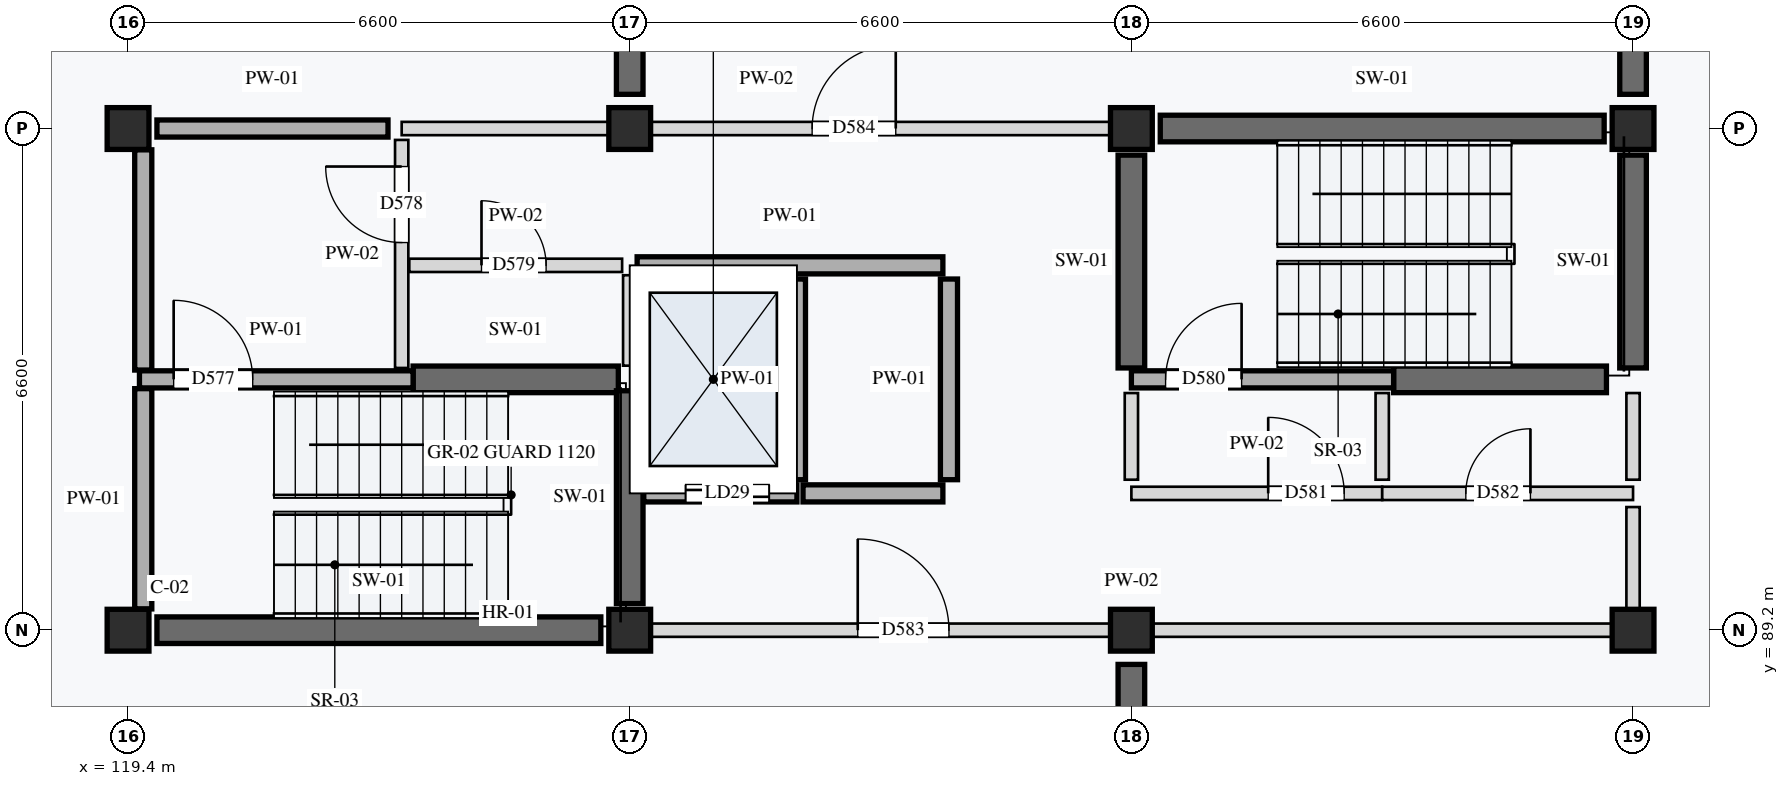
"""IFC4 building model, lengths in metres.
Left out: names, types, materials, properties, quantities, classifications, styles, units other than length and angle.
Written with IfcOpenShell. Run it as: python <this file> out.ifc"""

import sys

from ifc_helpers import new_model, si_unit, direction, frame, frame_2d, origin, origin_2d, place, context, subcontext, project, spatial, rectangle, extrude, element, fill, save


model = new_model("IFC4")
c1 = context("Model", 3, precision=1e-05, world=origin(), true_north=direction((0.0, 1.0)))
c2 = subcontext(c1, "Body", "Model", "MODEL_VIEW")
j1 = project(units=[si_unit("LENGTHUNIT", "METRE"), si_unit("PLANEANGLEUNIT", "RADIAN")], contexts=[c1])
p1 = place(None, origin())
s1 = spatial("IfcSite", under=j1, at=p1, CompositionType="ELEMENT")
p2 = place(p1, origin())
s2 = spatial("IfcBuilding", under=s1, at=p2, CompositionType="ELEMENT")
p3 = place(p2, frame((0.0, 0.0, -3.8)))
s3 = spatial("IfcBuildingStorey", under=s2, at=p3, CompositionType="ELEMENT", Elevation=-3.8)
for number, where, z_axis, x_axis in (
    (1, (119.4, 89.2, 0.0), (0.0, 0.0, 1.0), (1.0, 0.0, 0.0)),
    (2, (119.4, 95.8, 0.0), (0.0, 0.0, 1.0), (1.0, 0.0, 0.0)),
    (3, (126.0, 89.2, 0.0), (0.0, 0.0, 1.0), (1.0, 0.0, 0.0)),
    (4, (126.0, 95.8, 0.0), (0.0, 0.0, 1.0), (1.0, 0.0, 0.0)),
    (5, (132.6, 89.2, 0.0), (0.0, 0.0, 1.0), (1.0, 0.0, 0.0)),
    (6, (132.6, 95.8, 0.0), (0.0, 0.0, 1.0), (1.0, 0.0, 0.0)),
    (7, (139.2, 89.2, 0.0), (0.0, 0.0, 1.0), (1.0, 0.0, 0.0)),
    (8, (139.2, 95.8, 0.0), (0.0, 0.0, 1.0), (1.0, 0.0, 0.0)),
):
    element("IfcColumn", number, at=place(p3, frame(where, z_axis=z_axis, x_axis=x_axis)), inside=s3, PredefinedType="COLUMN", context=c2, shape_type="SweptSolid", body=[
        extrude(rectangle(XDim=0.55, YDim=0.55, at=origin_2d()), origin(), (0.0, 0.0, 1.0), 3.8),
    ])
p4 = place(p3, frame((119.78, 89.2, 0.0), z_axis=(0.0, 0.0, 1.0), x_axis=(1.0, 0.0, 0.0)))
e9 = element("IfcWall", 9, at=p4, inside=s3, PredefinedType="SHEAR", context=c2, shape_type="SweptSolid", body=[
    extrude(rectangle(XDim=5.84, YDim=0.35, at=frame_2d((2.92, 0.0))), origin(), (0.0, 0.0, 1.0), 3.52),
])
p5 = place(p3, frame((123.15, 92.5, 0.0), z_axis=(0.0, 0.0, 1.0), x_axis=(1.0, 0.0, 0.0)))
e10 = element("IfcWall", 10, at=p5, inside=s3, PredefinedType="SHEAR", context=c2, shape_type="SweptSolid", body=[
    extrude(rectangle(XDim=2.7, YDim=0.35, at=frame_2d((1.35, 0.0))), origin(), (0.0, 0.0, 1.0), 3.52),
])
p6 = place(p3, frame((126.0, 89.55, 0.0), z_axis=(0.0, 0.0, 1.0), x_axis=(0.0, 1.0, 0.0)))
e11 = element("IfcWall", 11, at=p6, inside=s3, PredefinedType="SHEAR", context=c2, shape_type="SweptSolid", body=[
    extrude(rectangle(XDim=2.8, YDim=0.35, at=frame_2d((1.4, 0.0))), origin(), (0.0, 0.0, 1.0), 3.52),
])
p7 = place(p3, frame((132.98, 95.8, 0.0), z_axis=(0.0, 0.0, 1.0), x_axis=(1.0, 0.0, 0.0)))
e12 = element("IfcWall", 12, at=p7, inside=s3, PredefinedType="SHEAR", context=c2, shape_type="SweptSolid", body=[
    extrude(rectangle(XDim=5.84, YDim=0.35, at=frame_2d((2.92, 0.0))), origin(), (0.0, 0.0, 1.0), 3.52),
])
for number, where, z_axis, x_axis in (
    (13, (136.05, 92.5, 0.0), (0.0, 0.0, 1.0), (1.0, 0.0, 0.0)),
    (14, (132.6, 92.65, 0.0), (0.0, 0.0, 1.0), (0.0, 1.0, 0.0)),
    (15, (139.2, 92.65, 0.0), (0.0, 0.0, 1.0), (0.0, 1.0, 0.0)),
):
    element("IfcWall", number, at=place(p3, frame(where, z_axis=z_axis, x_axis=x_axis)), inside=s3, PredefinedType="SHEAR", context=c2, shape_type="SweptSolid", body=[
        extrude(rectangle(XDim=2.8, YDim=0.35, at=frame_2d((1.4, 0.0))), origin(), (0.0, 0.0, 1.0), 3.52),
    ])
for number, where, z_axis, x_axis in (
    (16, (132.6, 83.05, 0.0), (0.0, 0.0, 1.0), (0.0, 1.0, 0.0)),
    (17, (126.0, 96.25, 0.0), (0.0, 0.0, 1.0), (0.0, 1.0, 0.0)),
    (18, (139.2, 96.25, 0.0), (0.0, 0.0, 1.0), (0.0, 1.0, 0.0)),
):
    element("IfcWall", number, at=place(p3, frame(where, z_axis=z_axis, x_axis=x_axis)), inside=s3, PredefinedType="SHEAR", context=c2, shape_type="SweptSolid", body=[
        extrude(rectangle(XDim=5.7, YDim=0.35, at=frame_2d((2.85, 0.0))), origin(), (0.0, 0.0, 1.0), 3.52),
    ])
p8 = place(p3, frame((119.55, 92.5, 0.0), z_axis=(0.0, 0.0, 1.0), x_axis=(1.0, 0.0, 0.0)))
e19 = element("IfcWall", 19, at=p8, inside=s3, PredefinedType="STANDARD", context=c2, shape_type="SweptSolid", body=[
    extrude(rectangle(XDim=3.6, YDim=0.225, at=frame_2d((1.8, 0.0))), origin(), (0.0, 0.0, 1.0), 3.52),
])
p9 = place(p8, frame((0.45, 0.0, 0.0)))
e20 = element("IfcOpeningElement", 20, at=p9, cuts=e19, PredefinedType="OPENING", context=c2, shape_type="SweptSolid", body=[
    extrude(rectangle(XDim=1.04, YDim=2.12, at=frame_2d((0.52, 1.06))), frame((0.0, 0.123, 0.0), z_axis=(0.0, -1.0, 0.0), x_axis=(1.0, 0.0, 0.0)), (0.0, 0.0, 1.0), 0.245),
])
p10 = place(p3, frame((123.0, 92.65, 0.0), z_axis=(0.0, 0.0, 1.0), x_axis=(0.0, 1.0, 0.0)))
e21 = element("IfcWall", 21, at=p10, inside=s3, PredefinedType="PARTITIONING", context=c2, shape_type="SweptSolid", body=[
    extrude(rectangle(XDim=3.0, YDim=0.175, at=frame_2d((1.5, 0.0))), origin(), (0.0, 0.0, 1.0), 3.52),
])
p11 = place(p10, frame((1.65, 0.0, 0.0)))
e22 = element("IfcOpeningElement", 22, at=p11, cuts=e21, PredefinedType="OPENING", context=c2, shape_type="SweptSolid", body=[
    extrude(rectangle(XDim=1.0, YDim=2.1, at=frame_2d((0.5, 1.05))), frame((0.0, 0.097, 0.0), z_axis=(0.0, -1.0, 0.0), x_axis=(1.0, 0.0, 0.0)), (0.0, 0.0, 1.0), 0.195),
])
p12 = place(p3, frame((123.1, 94.0, 0.0), z_axis=(0.0, 0.0, 1.0), x_axis=(1.0, 0.0, 0.0)))
e23 = element("IfcWall", 23, at=p12, inside=s3, PredefinedType="PARTITIONING", context=c2, shape_type="SweptSolid", body=[
    extrude(rectangle(XDim=2.8, YDim=0.175, at=frame_2d((1.4, 0.0))), origin(), (0.0, 0.0, 1.0), 3.52),
])
p13 = place(p12, frame((0.95, 0.0, 0.0)))
e24 = element("IfcOpeningElement", 24, at=p13, cuts=e23, PredefinedType="OPENING", context=c2, shape_type="SweptSolid", body=[
    extrude(rectangle(XDim=0.85, YDim=2.0, at=frame_2d((0.425, 1.0))), frame((0.0, 0.097, 0.0), z_axis=(0.0, -1.0, 0.0), x_axis=(1.0, 0.0, 0.0)), (0.0, 0.0, 1.0), 0.195),
])
p14 = place(p3, frame((126.0, 92.68, 0.0), z_axis=(0.0, 0.0, 1.0), x_axis=(0.0, 1.0, 0.0)))
e25 = element("IfcWall", 25, at=p14, inside=s3, PredefinedType="PARTITIONING", context=c2, shape_type="SweptSolid", body=[
    extrude(rectangle(XDim=1.19, YDim=0.175, at=frame_2d((0.595, 0.0))), origin(), (0.0, 0.0, 1.0), 3.52),
])
p15 = place(p3, frame((126.185, 91.0, 0.0), z_axis=(0.0, 0.0, 1.0), x_axis=(1.0, 0.0, 0.0)))
e26 = element("IfcWall", 26, at=p15, inside=s3, PredefinedType="STANDARD", context=c2, shape_type="SweptSolid", body=[
    extrude(rectangle(XDim=2.015, YDim=0.225, at=frame_2d((1.007, 0.0))), origin(), (0.0, 0.0, 1.0), 3.52),
])
p16 = place(p15, frame((0.55, 0.0, 0.0)))
e27 = element("IfcOpeningElement", 27, at=p16, cuts=e26, PredefinedType="OPENING", context=c2, shape_type="SweptSolid", body=[
    extrude(rectangle(XDim=1.1, YDim=2.1, at=frame_2d((0.55, 1.05))), frame((0.0, 0.123, 0.0), z_axis=(0.0, -1.0, 0.0), x_axis=(1.0, 0.0, 0.0)), (0.0, 0.0, 1.0), 0.245),
])
p17 = place(p3, frame((128.28, 91.0, 0.0), z_axis=(0.0, 0.0, 1.0), x_axis=(1.0, 0.0, 0.0)))
e28 = element("IfcWall", 28, at=p17, inside=s3, PredefinedType="STANDARD", context=c2, shape_type="SweptSolid", body=[
    extrude(rectangle(XDim=1.84, YDim=0.225, at=frame_2d((0.92, 0.0))), origin(), (0.0, 0.0, 1.0), 3.52),
])
p18 = place(p3, frame((126.097, 94.0, 0.0), z_axis=(0.0, 0.0, 1.0), x_axis=(1.0, 0.0, 0.0)))
e29 = element("IfcWall", 29, at=p18, inside=s3, PredefinedType="STANDARD", context=c2, shape_type="SweptSolid", body=[
    extrude(rectangle(XDim=4.023, YDim=0.225, at=frame_2d((2.011, 0.0))), origin(), (0.0, 0.0, 1.0), 3.52),
])
for number, where, z_axis, x_axis in (
    (30, (128.2, 91.18, 0.0), (0.0, 0.0, 1.0), (0.0, 1.0, 0.0)),
    (31, (130.2, 91.18, 0.0), (0.0, 0.0, 1.0), (0.0, 1.0, 0.0)),
):
    element("IfcWall", number, at=place(p3, frame(where, z_axis=z_axis, x_axis=x_axis)), inside=s3, PredefinedType="STANDARD", context=c2, shape_type="SweptSolid", body=[
        extrude(rectangle(XDim=2.64, YDim=0.225, at=frame_2d((1.32, 0.0))), origin(), (0.0, 0.0, 1.0), 3.52),
    ])
p19 = place(p3, frame((132.6, 92.5, 0.0), z_axis=(0.0, 0.0, 1.0), x_axis=(1.0, 0.0, 0.0)))
e32 = element("IfcWall", 32, at=p19, inside=s3, PredefinedType="STANDARD", context=c2, shape_type="SweptSolid", body=[
    extrude(rectangle(XDim=3.45, YDim=0.225, at=frame_2d((1.725, 0.0))), origin(), (0.0, 0.0, 1.0), 3.52),
])
p20 = place(p19, frame((0.45, 0.0, 0.0)))
e33 = element("IfcOpeningElement", 33, at=p20, cuts=e32, PredefinedType="OPENING", context=c2, shape_type="SweptSolid", body=[
    extrude(rectangle(XDim=1.0, YDim=2.1, at=frame_2d((0.5, 1.05))), frame((0.0, 0.123, 0.0), z_axis=(0.0, -1.0, 0.0), x_axis=(1.0, 0.0, 0.0)), (0.0, 0.0, 1.0), 0.245),
])
p21 = place(p3, frame((132.6, 91.0, 0.0), z_axis=(0.0, 0.0, 1.0), x_axis=(1.0, 0.0, 0.0)))
e34 = element("IfcWall", 34, at=p21, inside=s3, PredefinedType="PARTITIONING", context=c2, shape_type="SweptSolid", body=[
    extrude(rectangle(XDim=3.3, YDim=0.175, at=frame_2d((1.65, 0.0))), origin(), (0.0, 0.0, 1.0), 3.52),
])
p22 = place(p21, frame((1.8, 0.0, 0.0)))
e35 = element("IfcOpeningElement", 35, at=p22, cuts=e34, PredefinedType="OPENING", context=c2, shape_type="SweptSolid", body=[
    extrude(rectangle(XDim=1.0, YDim=2.16, at=frame_2d((0.5, 1.08))), frame((0.0, 0.097, 0.0), z_axis=(0.0, -1.0, 0.0), x_axis=(1.0, 0.0, 0.0)), (0.0, 0.0, 1.0), 0.195),
])
p23 = place(p3, frame((135.9, 91.0, 0.0), z_axis=(0.0, 0.0, 1.0), x_axis=(1.0, 0.0, 0.0)))
e36 = element("IfcWall", 36, at=p23, inside=s3, PredefinedType="PARTITIONING", context=c2, shape_type="SweptSolid", body=[
    extrude(rectangle(XDim=3.3, YDim=0.175, at=frame_2d((1.65, 0.0))), origin(), (0.0, 0.0, 1.0), 3.52),
])
p24 = place(p23, frame((1.1, 0.0, 0.0)))
e37 = element("IfcOpeningElement", 37, at=p24, cuts=e36, PredefinedType="OPENING", context=c2, shape_type="SweptSolid", body=[
    extrude(rectangle(XDim=0.85, YDim=2.0, at=frame_2d((0.425, 1.0))), frame((0.0, 0.097, 0.0), z_axis=(0.0, -1.0, 0.0), x_axis=(1.0, 0.0, 0.0)), (0.0, 0.0, 1.0), 0.195),
])
p25 = place(p3, frame((132.6, 91.18, 0.0), z_axis=(0.0, 0.0, 1.0), x_axis=(0.0, 1.0, 0.0)))
e38 = element("IfcWall", 38, at=p25, inside=s3, PredefinedType="PARTITIONING", context=c2, shape_type="SweptSolid", body=[
    extrude(rectangle(XDim=1.14, YDim=0.175, at=frame_2d((0.57, 0.0))), origin(), (0.0, 0.0, 1.0), 3.35),
])
for number, where, z_axis, x_axis in (
    (39, (135.9, 91.18, 0.0), (0.0, 0.0, 1.0), (0.0, 1.0, 0.0)),
    (40, (139.2, 91.18, 0.0), (0.0, 0.0, 1.0), (0.0, 1.0, 0.0)),
):
    element("IfcWall", number, at=place(p3, frame(where, z_axis=z_axis, x_axis=x_axis)), inside=s3, PredefinedType="PARTITIONING", context=c2, shape_type="SweptSolid", body=[
        extrude(rectangle(XDim=1.14, YDim=0.175, at=frame_2d((0.57, 0.0))), origin(), (0.0, 0.0, 1.0), 3.52),
    ])
p26 = place(p3, frame((126.0, 89.2, 0.0), z_axis=(0.0, 0.0, 1.0), x_axis=(1.0, 0.0, 0.0)))
e41 = element("IfcWall", 41, at=p26, inside=s3, PredefinedType="PARTITIONING", context=c2, shape_type="SweptSolid", body=[
    extrude(rectangle(XDim=13.2, YDim=0.175, at=frame_2d((6.6, 0.0))), origin(), (0.0, 0.0, 1.0), 3.15),
])
p27 = place(p26, frame((3.0, 0.0, 0.0)))
e42 = element("IfcOpeningElement", 42, at=p27, cuts=e41, PredefinedType="OPENING", context=c2, shape_type="SweptSolid", body=[
    extrude(rectangle(XDim=1.2, YDim=2.18, at=frame_2d((0.6, 1.09))), frame((0.0, 0.097, 0.0), z_axis=(0.0, -1.0, 0.0), x_axis=(1.0, 0.0, 0.0)), (0.0, 0.0, 1.0), 0.195),
])
p28 = place(p3, frame((123.0, 95.8, 0.0), z_axis=(0.0, 0.0, 1.0), x_axis=(1.0, 0.0, 0.0)))
e43 = element("IfcWall", 43, at=p28, inside=s3, PredefinedType="PARTITIONING", context=c2, shape_type="SweptSolid", body=[
    extrude(rectangle(XDim=9.6, YDim=0.175, at=frame_2d((4.8, 0.0))), origin(), (0.0, 0.0, 1.0), 3.15),
])
p29 = place(p28, frame((5.4, 0.0, 0.0)))
e44 = element("IfcOpeningElement", 44, at=p29, cuts=e43, PredefinedType="OPENING", context=c2, shape_type="SweptSolid", body=[
    extrude(rectangle(XDim=1.1, YDim=2.15, at=frame_2d((0.55, 1.075))), frame((0.0, 0.097, 0.0), z_axis=(0.0, -1.0, 0.0), x_axis=(1.0, 0.0, 0.0)), (0.0, 0.0, 1.0), 0.195),
])
p30 = place(p3, frame((139.2, 89.38, 0.0), z_axis=(0.0, 0.0, 1.0), x_axis=(0.0, 1.0, 0.0)))
e45 = element("IfcWall", 45, at=p30, inside=s3, PredefinedType="PARTITIONING", context=c2, shape_type="SweptSolid", body=[
    extrude(rectangle(XDim=1.44, YDim=0.175, at=frame_2d((0.72, 0.0))), origin(), (0.0, 0.0, 1.0), 3.52),
])
p31 = place(p3, frame((119.78, 95.8, 0.0), z_axis=(0.0, 0.0, 1.0), x_axis=(1.0, 0.0, 0.0)))
e46 = element("IfcWall", 46, at=p31, inside=s3, PredefinedType="STANDARD", context=c2, shape_type="SweptSolid", body=[
    extrude(rectangle(XDim=3.04, YDim=0.225, at=frame_2d((1.52, 0.0))), origin(), (0.0, 0.0, 1.0), 3.15),
])
for number, where, z_axis, x_axis in (
    (47, (119.6, 89.48, 0.0), (0.0, 0.0, 1.0), (0.0, 1.0, 0.0)),
    (48, (119.6, 92.623, 0.0), (0.0, 0.0, 1.0), (0.0, 1.0, 0.0)),
):
    element("IfcWall", number, at=place(p3, frame(where, z_axis=z_axis, x_axis=x_axis)), inside=s3, PredefinedType="STANDARD", context=c2, shape_type="SweptSolid", body=[
        extrude(rectangle(XDim=2.897, YDim=0.225, at=frame_2d((1.449, 0.0))), origin(), (0.0, 0.0, 1.0), 3.52),
    ])
p32 = place(p9, origin())
e49 = element("IfcDoor", 49, at=p32, inside=s3, OperationType="SINGLE_SWING_LEFT", PredefinedType="DOOR", context=c2, shape_type="SweptSolid", body=[
    extrude(rectangle(XDim=1.04, YDim=2.12, at=frame_2d((0.52, 1.06))), frame((0.0, 0.025, 0.0), z_axis=(0.0, -1.0, 0.0), x_axis=(1.0, 0.0, 0.0)), (0.0, 0.0, 1.0), 0.05),
])
fill(e20, e49)
p33 = place(p11, origin())
e50 = element("IfcDoor", 50, at=p33, inside=s3, OperationType="SINGLE_SWING_RIGHT", PredefinedType="DOOR", context=c2, shape_type="SweptSolid", body=[
    extrude(rectangle(XDim=1.0, YDim=2.1, at=frame_2d((0.5, 1.05))), frame((0.0, 0.025, 0.0), z_axis=(0.0, -1.0, 0.0), x_axis=(1.0, 0.0, 0.0)), (0.0, 0.0, 1.0), 0.05),
])
fill(e22, e50)
p34 = place(p13, origin())
e51 = element("IfcDoor", 51, at=p34, inside=s3, OperationType="SINGLE_SWING_LEFT", PredefinedType="DOOR", context=c2, shape_type="SweptSolid", body=[
    extrude(rectangle(XDim=0.85, YDim=2.0, at=frame_2d((0.425, 1.0))), frame((0.0, 0.025, 0.0), z_axis=(0.0, -1.0, 0.0), x_axis=(1.0, 0.0, 0.0)), (0.0, 0.0, 1.0), 0.05),
])
fill(e24, e51)
p35 = place(p16, origin())
e52 = element("IfcDoor", 52, at=p35, inside=s3, OperationType="DOUBLE_DOOR_SLIDING", PredefinedType="DOOR", context=c2, shape_type="SweptSolid", body=[
    extrude(rectangle(XDim=1.1, YDim=2.1, at=frame_2d((0.55, 1.05))), frame((0.0, 0.025, 0.0), z_axis=(0.0, -1.0, 0.0), x_axis=(1.0, 0.0, 0.0)), (0.0, 0.0, 1.0), 0.05),
])
fill(e27, e52)
p36 = place(p20, origin())
e53 = element("IfcDoor", 53, at=p36, inside=s3, OperationType="SINGLE_SWING_RIGHT", PredefinedType="DOOR", context=c2, shape_type="SweptSolid", body=[
    extrude(rectangle(XDim=1.0, YDim=2.1, at=frame_2d((0.5, 1.05))), frame((0.0, 0.025, 0.0), z_axis=(0.0, -1.0, 0.0), x_axis=(1.0, 0.0, 0.0)), (0.0, 0.0, 1.0), 0.05),
])
fill(e33, e53)
p37 = place(p22, origin())
e54 = element("IfcDoor", 54, at=p37, inside=s3, OperationType="SINGLE_SWING_LEFT", PredefinedType="DOOR", context=c2, shape_type="SweptSolid", body=[
    extrude(rectangle(XDim=1.0, YDim=2.16, at=frame_2d((0.5, 1.08))), frame((0.0, 0.025, 0.0), z_axis=(0.0, -1.0, 0.0), x_axis=(1.0, 0.0, 0.0)), (0.0, 0.0, 1.0), 0.05),
])
fill(e35, e54)
p38 = place(p24, origin())
e55 = element("IfcDoor", 55, at=p38, inside=s3, OperationType="SINGLE_SWING_RIGHT", PredefinedType="DOOR", context=c2, shape_type="SweptSolid", body=[
    extrude(rectangle(XDim=0.85, YDim=2.0, at=frame_2d((0.425, 1.0))), frame((0.0, 0.025, 0.0), z_axis=(0.0, -1.0, 0.0), x_axis=(1.0, 0.0, 0.0)), (0.0, 0.0, 1.0), 0.05),
])
fill(e37, e55)
p39 = place(p27, origin())
e56 = element("IfcDoor", 56, at=p39, inside=s3, OperationType="SINGLE_SWING_LEFT", PredefinedType="DOOR", context=c2, shape_type="SweptSolid", body=[
    extrude(rectangle(XDim=1.2, YDim=2.18, at=frame_2d((0.6, 1.09))), frame((0.0, 0.025, 0.0), z_axis=(0.0, -1.0, 0.0), x_axis=(1.0, 0.0, 0.0)), (0.0, 0.0, 1.0), 0.05),
])
fill(e42, e56)
p40 = place(p29, origin())
e57 = element("IfcDoor", 57, at=p40, inside=s3, OperationType="SINGLE_SWING_RIGHT", PredefinedType="DOOR", context=c2, shape_type="SweptSolid", body=[
    extrude(rectangle(XDim=1.1, YDim=2.15, at=frame_2d((0.55, 1.075))), frame((0.0, 0.025, 0.0), z_axis=(0.0, -1.0, 0.0), x_axis=(1.0, 0.0, 0.0)), (0.0, 0.0, 1.0), 0.05),
])
fill(e44, e57)
save(model, sys.argv[1])
